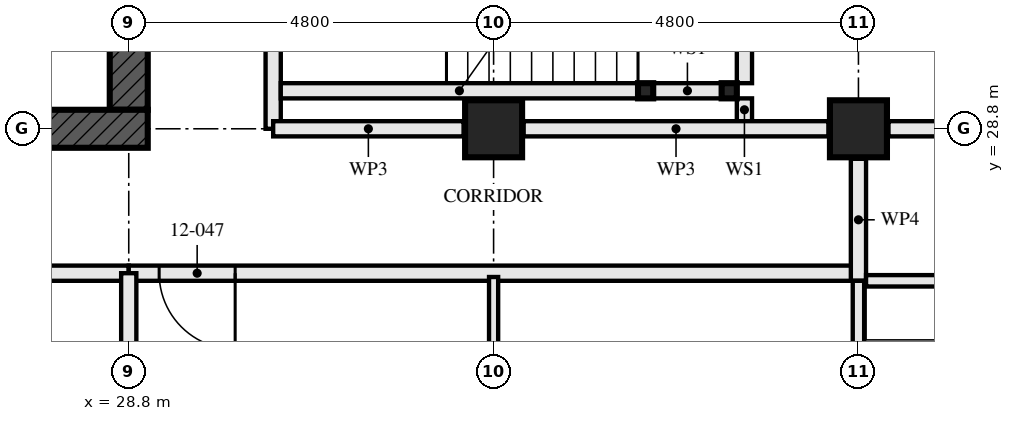
"""IFC4 building model, lengths in metres.
Left out: names, types, materials, properties, quantities, classifications, styles, units other than length and angle.
Written with IfcOpenShell. Run it as: python <this file> out.ifc"""

import sys

from ifc_helpers import new_model, si_unit, direction, frame, frame_2d, origin, origin_2d, place, context, subcontext, project, spatial, rectangle, hollow_rectangle, extrude, element, fill, save


model = new_model("IFC4")
c1 = context("Model", 3, precision=1e-05, world=origin(), true_north=direction((0.0, 1.0)))
c2 = subcontext(c1, "Body", "Model", "MODEL_VIEW")
j1 = project(units=[si_unit("LENGTHUNIT", "METRE"), si_unit("PLANEANGLEUNIT", "RADIAN")], contexts=[c1])
p1 = place(None, origin())
s1 = spatial("IfcSite", under=j1, at=p1, CompositionType="ELEMENT")
p2 = place(p1, origin())
s2 = spatial("IfcBuilding", under=s1, at=p2, CompositionType="ELEMENT")
p3 = place(p2, frame((0.0, 0.0, 48.0)))
s3 = spatial("IfcBuildingStorey", under=s2, at=p3, CompositionType="ELEMENT", Elevation=48.0)
for number, where, z_axis, x_axis in (
    (1, (33.6, 28.8, 0.0), (0.0, 0.0, 1.0), (0.0, 1.0, 0.0)),
    (2, (38.4, 28.8, 0.0), (0.0, 0.0, 1.0), (0.0, 1.0, 0.0)),
):
    element("IfcColumn", number, at=place(p3, frame(where, z_axis=z_axis, x_axis=x_axis)), inside=s3, PredefinedType="COLUMN", context=c2, shape_type="SweptSolid", body=[
        extrude(hollow_rectangle(XDim=0.75, YDim=0.75, WallThickness=0.08, at=origin_2d()), origin(), (0.0, 0.0, 1.0), 3.5),
    ])
p4 = place(p3, frame((14.15, 28.8, -0.17), z_axis=(0.0, 0.0, 1.0), x_axis=(1.0, 0.0, 0.0)))
e3 = element("IfcWall", 3, at=p4, inside=s3, PredefinedType="SHEAR", context=c2, shape_type="SweptSolid", body=[
    extrude(rectangle(XDim=14.9, YDim=0.5, at=frame_2d((7.45, 0.0))), origin(), (0.0, 0.0, 1.0), 3.5),
])
p5 = place(p4, frame((6.85, 0.0, 0.17)))
e4 = element("IfcOpeningElement", 4, at=p5, cuts=e3, PredefinedType="OPENING", context=c2, shape_type="SweptSolid", body=[
    extrude(rectangle(XDim=1.2, YDim=2.1, at=frame_2d((0.6, 1.05))), frame((0.0, 0.26, 0.0), z_axis=(0.0, -1.0, 0.0), x_axis=(1.0, 0.0, 0.0)), (0.0, 0.0, 1.0), 0.521),
])
p6 = place(p3, frame((28.8, 29.05, -0.17), z_axis=(0.0, 0.0, 1.0), x_axis=(0.0, 1.0, 0.0)))
e5 = element("IfcWall", 5, at=p6, inside=s3, PredefinedType="SHEAR", context=c2, shape_type="SweptSolid", body=[
    extrude(rectangle(XDim=13.9, YDim=0.5, at=frame_2d((6.95, 0.0))), origin(), (0.0, 0.0, 1.0), 3.5),
])
p7 = place(p6, frame((6.35, 0.0, 0.17)))
e6 = element("IfcOpeningElement", 6, at=p7, cuts=e5, PredefinedType="OPENING", context=c2, shape_type="SweptSolid", body=[
    extrude(rectangle(XDim=1.2, YDim=2.1, at=frame_2d((0.6, 1.05))), frame((0.0, 0.26, 0.0), z_axis=(0.0, -1.0, 0.0), x_axis=(1.0, 0.0, 0.0)), (0.0, 0.0, 1.0), 0.521),
])
for number, where, z_axis, x_axis in (
    (7, (36.7, 29.3, 0.0), (0.0, 0.0, 1.0), (1.0, 0.0, 0.0)),
    (8, (35.6, 29.3, 0.0), (0.0, 0.0, 1.0), (1.0, 0.0, 0.0)),
):
    element("IfcColumn", number, at=place(p3, frame(where, z_axis=z_axis, x_axis=x_axis)), inside=s3, PredefinedType="COLUMN", context=c2, shape_type="SweptSolid", body=[
        extrude(hollow_rectangle(XDim=0.2, YDim=0.2, WallThickness=0.008, at=origin_2d()), origin(), (0.0, 0.0, 1.0), 3.33),
    ])
p8 = place(p3, frame((14.4, 26.9, 0.0), z_axis=(0.0, 0.0, 1.0), x_axis=(1.0, 0.0, 0.0)))
e9 = element("IfcWall", 9, at=p8, inside=s3, PredefinedType="PARTITIONING", context=c2, shape_type="SweptSolid", body=[
    extrude(rectangle(XDim=14.4, YDim=0.2, at=frame_2d((7.2, 0.0))), origin(), (0.0, 0.0, 1.0), 2.55),
])
p9 = place(p8, frame((1.4, 0.0, 0.0)))
e10 = element("IfcOpeningElement", 10, at=p9, cuts=e9, PredefinedType="OPENING", context=c2, shape_type="SweptSolid", body=[
    extrude(rectangle(XDim=1.0, YDim=2.1, at=frame_2d((0.5, 1.05))), frame((0.0, 0.111, 0.0), z_axis=(0.0, -1.0, 0.0), x_axis=(1.0, 0.0, 0.0)), (0.0, 0.0, 1.0), 0.221),
])
p10 = place(p8, frame((3.65, 0.0, 0.0)))
e11 = element("IfcOpeningElement", 11, at=p10, cuts=e9, PredefinedType="OPENING", context=c2, shape_type="SweptSolid", body=[
    extrude(rectangle(XDim=0.9, YDim=2.1, at=frame_2d((0.45, 1.05))), frame((0.0, 0.111, 0.0), z_axis=(0.0, -1.0, 0.0), x_axis=(1.0, 0.0, 0.0)), (0.0, 0.0, 1.0), 0.221),
])
p11 = place(p8, frame((5.2, 0.0, 0.0)))
e12 = element("IfcOpeningElement", 12, at=p11, cuts=e9, PredefinedType="OPENING", context=c2, shape_type="SweptSolid", body=[
    extrude(rectangle(XDim=1.0, YDim=2.1, at=frame_2d((0.5, 1.05))), frame((0.0, 0.111, 0.0), z_axis=(0.0, -1.0, 0.0), x_axis=(1.0, 0.0, 0.0)), (0.0, 0.0, 1.0), 0.221),
])
p12 = place(p8, frame((10.0, 0.0, 0.0)))
e13 = element("IfcOpeningElement", 13, at=p12, cuts=e9, PredefinedType="OPENING", context=c2, shape_type="SweptSolid", body=[
    extrude(rectangle(XDim=1.0, YDim=2.1, at=frame_2d((0.5, 1.05))), frame((0.0, 0.111, 0.0), z_axis=(0.0, -1.0, 0.0), x_axis=(1.0, 0.0, 0.0)), (0.0, 0.0, 1.0), 0.221),
])
p13 = place(p3, frame((38.4, 23.8, 0.0), z_axis=(0.0, 0.0, 1.0), x_axis=(0.0, 1.0, 0.0)))
e14 = element("IfcWall", 14, at=p13, inside=s3, PredefinedType="PARTITIONING", context=c2, shape_type="SweptSolid", body=[
    extrude(rectangle(XDim=3.0, YDim=0.15, at=frame_2d((1.5, 0.0))), origin(), (0.0, 0.0, 1.0), 2.55),
])
p14 = place(p13, frame((1.05, 0.0, 0.0)))
e15 = element("IfcOpeningElement", 15, at=p14, cuts=e14, PredefinedType="OPENING", context=c2, shape_type="SweptSolid", body=[
    extrude(rectangle(XDim=0.9, YDim=2.1, at=frame_2d((0.45, 1.05))), frame((0.0, 0.085, 0.0), z_axis=(0.0, -1.0, 0.0), x_axis=(1.0, 0.0, 0.0)), (0.0, 0.0, 1.0), 0.171),
])
p15 = place(p3, frame((33.6, 18.6, 0.0), z_axis=(0.0, 0.0, 1.0), x_axis=(0.0, 1.0, 0.0)))
e16 = element("IfcWall", 16, at=p15, inside=s3, PredefinedType="PARTITIONING", context=c2, shape_type="SweptSolid", body=[
    extrude(rectangle(XDim=8.25, YDim=0.12, at=frame_2d((4.125, 0.0))), origin(), (0.0, 0.0, 1.0), 2.55),
])
p16 = place(p15, frame((5.15, 0.0, 0.0)))
e17 = element("IfcOpeningElement", 17, at=p16, cuts=e16, PredefinedType="OPENING", context=c2, shape_type="SweptSolid", body=[
    extrude(rectangle(XDim=0.9, YDim=2.1, at=frame_2d((0.45, 1.05))), frame((0.0, 0.071, 0.0), z_axis=(0.0, -1.0, 0.0), x_axis=(1.0, 0.0, 0.0)), (0.0, 0.0, 1.0), 0.141),
])
p17 = place(p3, frame((28.8, 26.9, 0.0), z_axis=(0.0, 0.0, 1.0), x_axis=(1.0, 0.0, 0.0)))
e18 = element("IfcWall", 18, at=p17, inside=s3, PredefinedType="PARTITIONING", context=c2, shape_type="SweptSolid", body=[
    extrude(rectangle(XDim=9.6, YDim=0.2, at=frame_2d((4.8, 0.0))), origin(), (0.0, 0.0, 1.0), 3.33),
])
p18 = place(p17, frame((0.4, 0.0, 0.0)))
e19 = element("IfcOpeningElement", 19, at=p18, cuts=e18, PredefinedType="OPENING", context=c2, shape_type="SweptSolid", body=[
    extrude(rectangle(XDim=1.0, YDim=2.1, at=frame_2d((0.5, 1.05))), frame((0.0, 0.111, 0.0), z_axis=(0.0, -1.0, 0.0), x_axis=(1.0, 0.0, 0.0)), (0.0, 0.0, 1.0), 0.221),
])
p19 = place(p3, frame((38.4, 26.8, 0.0), z_axis=(0.0, 0.0, 1.0), x_axis=(0.0, 1.0, 0.0)))
e20 = element("IfcWall", 20, at=p19, inside=s3, PredefinedType="PARTITIONING", context=c2, shape_type="SweptSolid", body=[
    extrude(rectangle(XDim=1.605, YDim=0.2, at=frame_2d((0.802, 0.0))), origin(), (0.0, 0.0, 1.0), 3.33),
])
p20 = place(p3, frame((36.6, 29.3, 0.0), z_axis=(0.0, 0.0, 1.0), x_axis=(-1.0, 0.0, 0.0)))
e21 = element("IfcWall", 21, at=p20, inside=s3, PredefinedType="SOLIDWALL", context=c2, shape_type="SweptSolid", body=[
    extrude(rectangle(XDim=0.9, YDim=0.2, at=frame_2d((0.45, 0.0))), origin(), (0.0, 0.0, 1.0), 2.99),
])
p21 = place(p3, frame((35.5, 29.3, 0.0), z_axis=(0.0, 0.0, 1.0), x_axis=(-1.0, 0.0, 0.0)))
e22 = element("IfcWall", 22, at=p21, inside=s3, PredefinedType="SOLIDWALL", context=c2, shape_type="SweptSolid", body=[
    extrude(rectangle(XDim=4.7, YDim=0.2, at=frame_2d((2.35, 0.0))), origin(), (0.0, 0.0, 1.0), 2.99),
])
p22 = place(p3, frame((36.9, 28.9, 0.0), z_axis=(0.0, 0.0, 1.0), x_axis=(0.0, 1.0, 0.0)))
e23 = element("IfcWall", 23, at=p22, inside=s3, PredefinedType="SOLIDWALL", context=c2, shape_type="SweptSolid", body=[
    extrude(rectangle(XDim=0.3, YDim=0.2, at=frame_2d((0.15, 0.0))), origin(), (0.0, 0.0, 1.0), 3.33),
])
p23 = place(p3, frame((36.9, 29.4, 0.0), z_axis=(0.0, 0.0, 1.0), x_axis=(0.0, 1.0, 0.0)))
e24 = element("IfcWall", 24, at=p23, inside=s3, PredefinedType="SOLIDWALL", context=c2, shape_type="SweptSolid", body=[
    extrude(rectangle(XDim=2.6, YDim=0.2, at=frame_2d((1.3, 0.0))), origin(), (0.0, 0.0, 1.0), 3.33),
])
p24 = place(p3, frame((30.7, 28.8, 0.0), z_axis=(0.0, 0.0, 1.0), x_axis=(0.0, 1.0, 0.0)))
e25 = element("IfcWall", 25, at=p24, inside=s3, PredefinedType="PARTITIONING", context=c2, shape_type="SweptSolid", body=[
    extrude(rectangle(XDim=14.4, YDim=0.2, at=frame_2d((7.2, 0.0))), origin(), (0.0, 0.0, 1.0), 2.55),
])
p25 = place(p24, frame((1.4, 0.0, 0.0)))
e26 = element("IfcOpeningElement", 26, at=p25, cuts=e25, PredefinedType="OPENING", context=c2, shape_type="SweptSolid", body=[
    extrude(rectangle(XDim=1.0, YDim=2.1, at=frame_2d((0.5, 1.05))), frame((0.0, 0.111, 0.0), z_axis=(0.0, -1.0, 0.0), x_axis=(1.0, 0.0, 0.0)), (0.0, 0.0, 1.0), 0.221),
])
p26 = place(p24, frame((4.1, 0.0, 0.0)))
e27 = element("IfcOpeningElement", 27, at=p26, cuts=e25, PredefinedType="OPENING", context=c2, shape_type="SweptSolid", body=[
    extrude(rectangle(XDim=1.0, YDim=2.1, at=frame_2d((0.5, 1.05))), frame((0.0, 0.111, 0.0), z_axis=(0.0, -1.0, 0.0), x_axis=(1.0, 0.0, 0.0)), (0.0, 0.0, 1.0), 0.221),
])
p27 = place(p24, frame((5.975, 0.0, 0.0)))
e28 = element("IfcOpeningElement", 28, at=p27, cuts=e25, PredefinedType="OPENING", context=c2, shape_type="SweptSolid", body=[
    extrude(rectangle(XDim=1.0, YDim=2.1, at=frame_2d((0.5, 1.05))), frame((0.0, 0.111, 0.0), z_axis=(0.0, -1.0, 0.0), x_axis=(1.0, 0.0, 0.0)), (0.0, 0.0, 1.0), 0.221),
])
p28 = place(p24, frame((10.0, 0.0, 0.0)))
e29 = element("IfcOpeningElement", 29, at=p28, cuts=e25, PredefinedType="OPENING", context=c2, shape_type="SweptSolid", body=[
    extrude(rectangle(XDim=1.0, YDim=2.1, at=frame_2d((0.5, 1.05))), frame((0.0, 0.111, 0.0), z_axis=(0.0, -1.0, 0.0), x_axis=(1.0, 0.0, 0.0)), (0.0, 0.0, 1.0), 0.221),
])
p29 = place(p3, frame((28.8, 24.395, 0.0), z_axis=(0.0, 0.0, 1.0), x_axis=(0.0, 1.0, 0.0)))
e30 = element("IfcWall", 30, at=p29, inside=s3, PredefinedType="PARTITIONING", context=c2, shape_type="SweptSolid", body=[
    extrude(rectangle(XDim=2.505, YDim=0.2, at=frame_2d((1.252, 0.0))), origin(), (0.0, 0.0, 1.0), 2.32),
])
p30 = place(p3, frame((42.88, 28.8, 0.0), z_axis=(0.0, 0.0, 1.0), x_axis=(-1.0, 0.0, 0.0)))
e31 = element("IfcWall", 31, at=p30, inside=s3, PredefinedType="PARTITIONING", context=c2, shape_type="SweptSolid", body=[
    extrude(rectangle(XDim=4.085, YDim=0.2, at=frame_2d((2.042, 0.0))), origin(), (0.0, 0.0, 1.0), 2.32),
])
p31 = place(p3, frame((38.005, 28.8, 0.0), z_axis=(0.0, 0.0, 1.0), x_axis=(-1.0, 0.0, 0.0)))
e32 = element("IfcWall", 32, at=p31, inside=s3, PredefinedType="PARTITIONING", context=c2, shape_type="SweptSolid", body=[
    extrude(rectangle(XDim=4.01, YDim=0.2, at=frame_2d((2.005, 0.0))), origin(), (0.0, 0.0, 1.0), 2.32),
])
p32 = place(p3, frame((33.205, 28.8, 0.0), z_axis=(0.0, 0.0, 1.0), x_axis=(-1.0, 0.0, 0.0)))
e33 = element("IfcWall", 33, at=p32, inside=s3, PredefinedType="PARTITIONING", context=c2, shape_type="SweptSolid", body=[
    extrude(rectangle(XDim=2.505, YDim=0.2, at=frame_2d((1.252, 0.0))), origin(), (0.0, 0.0, 1.0), 2.32),
])
p33 = place(p3, frame((38.5, 26.8, 0.0), z_axis=(0.0, 0.0, 1.0), x_axis=(1.0, 0.0, 0.0)))
e34 = element("IfcWall", 34, at=p33, inside=s3, PredefinedType="PARTITIONING", context=c2, shape_type="SweptSolid", body=[
    extrude(rectangle(XDim=5.13, YDim=0.15, at=frame_2d((2.565, 0.0))), origin(), (0.0, 0.0, 1.0), 2.32),
])
p34 = place(p18, frame((1.0, 0.0, 0.0), z_axis=(0.0, 0.0, 1.0), x_axis=(-1.0, 0.0, 0.0)))
e35 = element("IfcDoor", 35, at=p34, inside=s3, OperationType="SINGLE_SWING_RIGHT", PredefinedType="DOOR", context=c2, shape_type="SweptSolid", body=[
    extrude(rectangle(XDim=1.0, YDim=2.1, at=frame_2d((0.5, 1.05))), frame((0.0, 0.027, 0.0), z_axis=(0.0, -1.0, 0.0), x_axis=(1.0, 0.0, 0.0)), (0.0, 0.0, 1.0), 0.054),
])
fill(e19, e35)
save(model, sys.argv[1])
